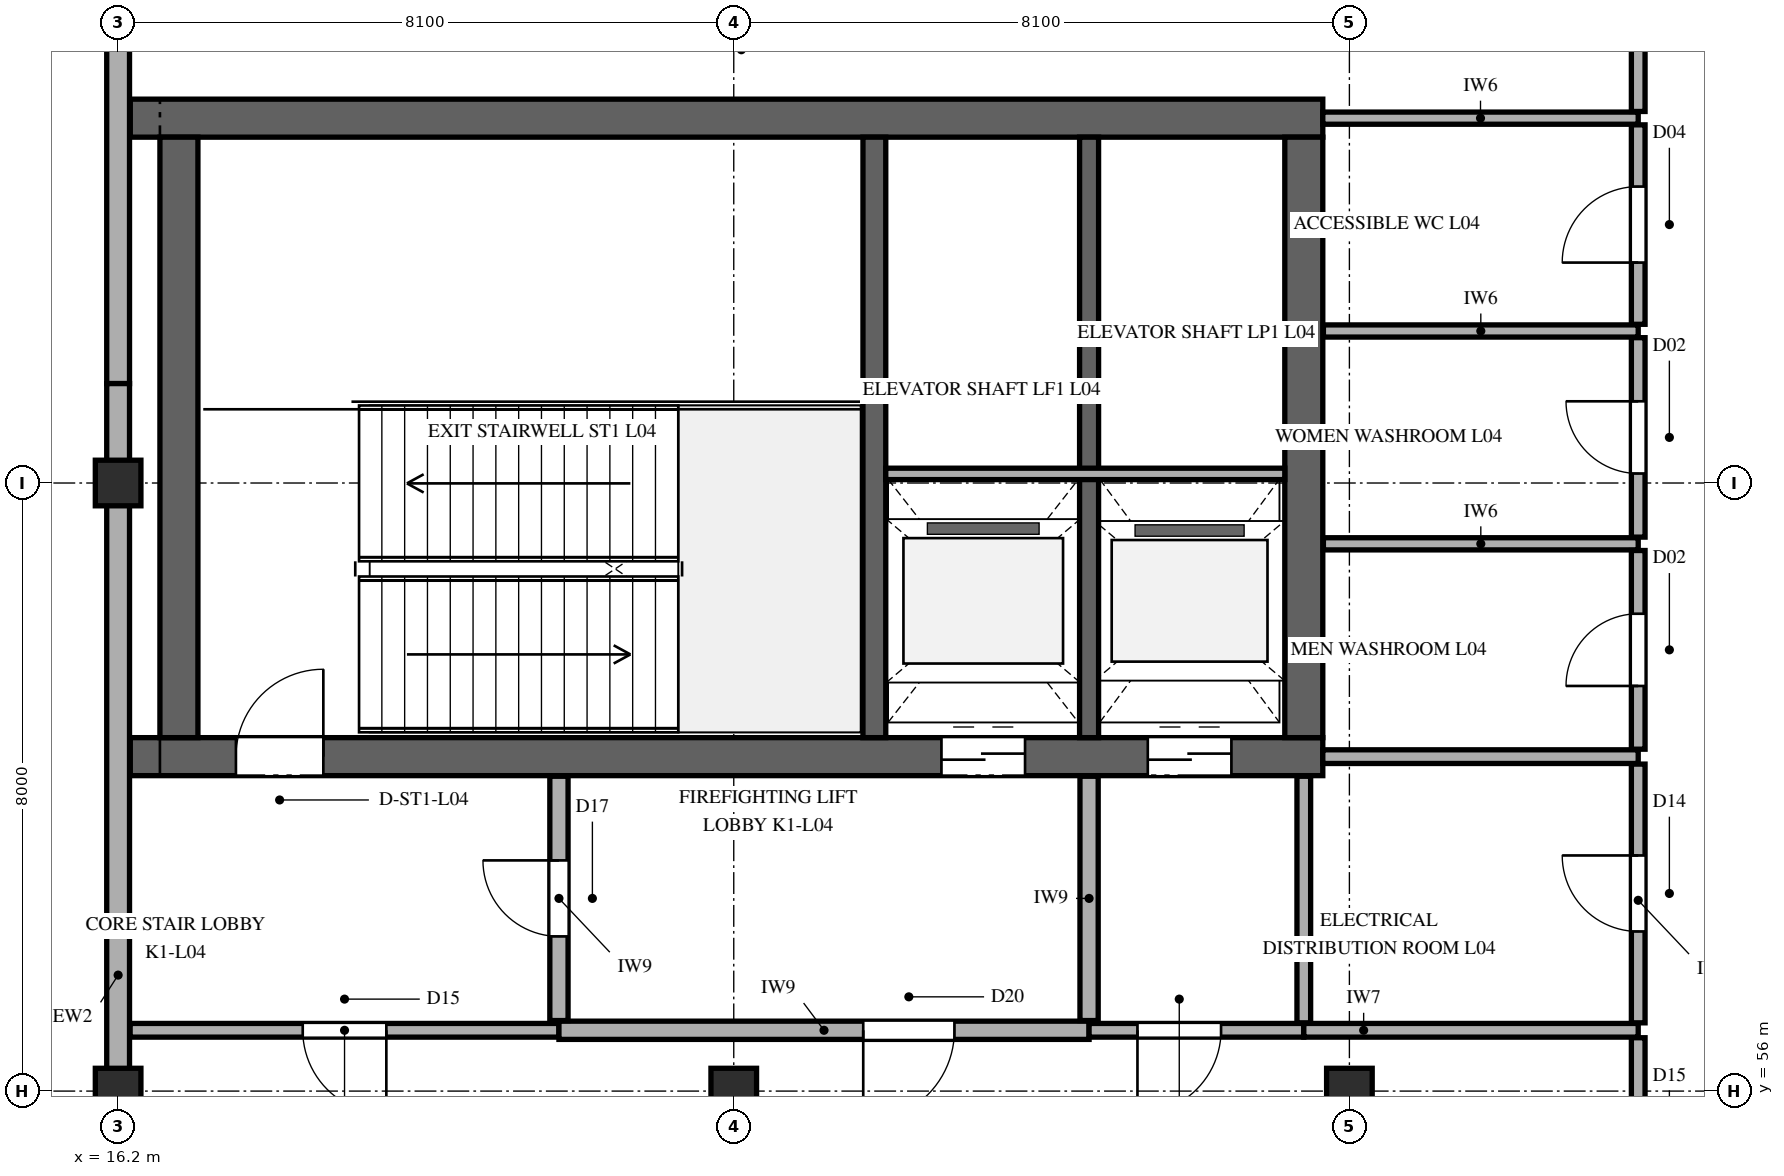
"""IFC4 building model, lengths in metres.
Left out: names, types, materials, properties, quantities, classifications, styles, units other than length and angle.
Written with IfcOpenShell. Run it as: python <this file> out.ifc"""

import sys

from ifc_helpers import new_model, si_unit, direction, frame, frame_2d, origin, origin_2d, place, context, subcontext, project, spatial, rectangle, extrude, element, fill, save


model = new_model("IFC4")
c1 = context("Model", 3, precision=1e-05, world=origin(), true_north=direction((0.0, 1.0)))
c2 = subcontext(c1, "Body", "Model", "MODEL_VIEW")
j1 = project(units=[si_unit("LENGTHUNIT", "METRE"), si_unit("PLANEANGLEUNIT", "RADIAN")], contexts=[c1])
p1 = place(None, origin())
s1 = spatial("IfcSite", under=j1, at=p1, CompositionType="ELEMENT")
p2 = place(p1, origin())
s2 = spatial("IfcBuilding", under=s1, at=p2, CompositionType="ELEMENT")
p3 = place(p2, frame((0.0, 0.0, 19.8)))
s3 = spatial("IfcBuildingStorey", under=s2, at=p3, CompositionType="ELEMENT", Elevation=19.8)
p4 = place(p3, frame((16.36, 60.4, 0.0), z_axis=(0.0, 0.0, 1.0), x_axis=(1.0, 0.0, 0.0)))
e1 = element("IfcWall", 1, at=p4, inside=s3, PredefinedType="SHEAR", context=c2, shape_type="SweptSolid", body=[
    extrude(rectangle(XDim=15.69, YDim=0.5, at=frame_2d((7.845, 0.0))), origin(), (0.0, 0.0, 1.0), 5.1),
])
p5 = place(p4, frame((1.39, 0.0, 0.0)))
e2 = element("IfcOpeningElement", 2, at=p5, cuts=e1, PredefinedType="OPENING", context=c2, shape_type="SweptSolid", body=[
    extrude(rectangle(XDim=1.15, YDim=2.25, at=frame_2d((0.575, 1.125))), frame((0.0, 0.26, 0.0), z_axis=(0.0, -1.0, 0.0), x_axis=(1.0, 0.0, 0.0)), (0.0, 0.0, 1.0), 0.52),
])
p6 = place(p4, frame((10.673, 0.0, 0.0)))
e3 = element("IfcOpeningElement", 3, at=p6, cuts=e1, PredefinedType="OPENING", context=c2, shape_type="SweptSolid", body=[
    extrude(rectangle(XDim=1.1, YDim=2.2, at=frame_2d((0.55, 1.1))), frame((0.0, 0.26, 0.0), z_axis=(0.0, -1.0, 0.0), x_axis=(1.0, 0.0, 0.0)), (0.0, 0.0, 1.0), 0.52),
])
p7 = place(p4, frame((13.387, 0.0, 0.0)))
e4 = element("IfcOpeningElement", 4, at=p7, cuts=e1, PredefinedType="OPENING", context=c2, shape_type="SweptSolid", body=[
    extrude(rectangle(XDim=1.1, YDim=2.2, at=frame_2d((0.55, 1.1))), frame((0.0, 0.26, 0.0), z_axis=(0.0, -1.0, 0.0), x_axis=(1.0, 0.0, 0.0)), (0.0, 0.0, 1.0), 0.52),
])
p8 = place(p3, frame((16.36, 68.8, 0.0), z_axis=(0.0, 0.0, 1.0), x_axis=(1.0, 0.0, 0.0)))
e5 = element("IfcWall", 5, at=p8, inside=s3, PredefinedType="SHEAR", context=c2, shape_type="SweptSolid", body=[
    extrude(rectangle(XDim=15.69, YDim=0.5, at=frame_2d((7.845, 0.0))), origin(), (0.0, 0.0, 1.0), 5.1),
])
for number, where, z_axis, x_axis in (
    (6, (17.0, 60.65, 0.0), (0.0, 0.0, 1.0), (0.0, 1.0, 0.0)),
    (7, (31.8, 60.65, 0.0), (0.0, 0.0, 1.0), (0.0, 1.0, 0.0)),
):
    element("IfcWall", number, at=place(p3, frame(where, z_axis=z_axis, x_axis=x_axis)), inside=s3, PredefinedType="SHEAR", context=c2, shape_type="SweptSolid", body=[
        extrude(rectangle(XDim=7.9, YDim=0.5, at=frame_2d((3.95, 0.0))), origin(), (0.0, 0.0, 1.0), 5.1),
    ])
p9 = place(p3, frame((26.15, 60.65, 0.0), z_axis=(0.0, 0.0, 1.0), x_axis=(0.0, 1.0, 0.0)))
e8 = element("IfcWall", 8, at=p9, inside=s3, PredefinedType="SHEAR", context=c2, shape_type="SweptSolid", body=[
    extrude(rectangle(XDim=7.9, YDim=0.3, at=frame_2d((3.95, 0.0))), origin(), (0.0, 0.0, 1.0), 5.1),
])
p10 = place(p3, frame((28.975, 60.65, 0.0), z_axis=(0.0, 0.0, 1.0), x_axis=(0.0, 1.0, 0.0)))
e9 = element("IfcWall", 9, at=p10, inside=s3, PredefinedType="SHEAR", context=c2, shape_type="SweptSolid", body=[
    extrude(rectangle(XDim=7.9, YDim=0.25, at=frame_2d((3.95, 0.0))), origin(), (0.0, 0.0, 1.0), 5.1),
])
for number, where, z_axis, x_axis in (
    (10, (16.2, 56.0, 0.0), (0.0, 0.0, 1.0), (1.0, 0.0, 0.0)),
    (11, (16.2, 64.0, 0.0), (0.0, 0.0, 1.0), (1.0, 0.0, 0.0)),
    (12, (24.3, 56.0, 0.0), (0.0, 0.0, 1.0), (1.0, 0.0, 0.0)),
    (13, (32.4, 56.0, 0.0), (0.0, 0.0, 1.0), (1.0, 0.0, 0.0)),
):
    element("IfcColumn", number, at=place(p3, frame(where, z_axis=z_axis, x_axis=x_axis)), inside=s3, PredefinedType="COLUMN", context=c2, shape_type="SweptSolid", body=[
        extrude(rectangle(XDim=0.6, YDim=0.6, at=origin_2d()), origin(), (0.0, 0.0, 1.0), 5.1),
    ])
p11 = place(p3, frame((16.2, 80.872, 0.0), z_axis=(0.0, 0.0, 1.0), x_axis=(0.0, -1.0, 0.0)))
e14 = element("IfcWall", 14, at=p11, inside=s3, PredefinedType="SOLIDWALL", context=c2, shape_type="SweptSolid", body=[
    extrude(rectangle(XDim=15.564, YDim=0.3, at=frame_2d((7.782, 0.0))), origin(), (0.0, 0.0, 1.0), 4.352),
])
p12 = place(p11, frame((4.5, 0.0, 0.85)))
e15 = element("IfcOpeningElement", 15, at=p12, cuts=e14, PredefinedType="OPENING", context=c2, shape_type="SweptSolid", body=[
    extrude(rectangle(XDim=1.35, YDim=2.1, at=frame_2d((0.675, 1.05))), frame((0.0, 0.16, 0.0), z_axis=(0.0, -1.0, 0.0), x_axis=(1.0, 0.0, 0.0)), (0.0, 0.0, 1.0), 0.32),
])
p13 = place(p3, frame((16.2, 65.308, 0.0), z_axis=(0.0, 0.0, 1.0), x_axis=(0.0, -1.0, 0.0)))
e16 = element("IfcWall", 16, at=p13, inside=s3, PredefinedType="SOLIDWALL", context=c2, shape_type="SweptSolid", body=[
    extrude(rectangle(XDim=15.564, YDim=0.3, at=frame_2d((7.782, 0.0))), origin(), (0.0, 0.0, 1.0), 4.289),
])
p14 = place(p3, frame((26.3, 64.12, 0.0), z_axis=(0.0, 0.0, 1.0), x_axis=(1.0, 0.0, 0.0)))
e17 = element("IfcWall", 17, at=p14, inside=s3, PredefinedType="PARTITIONING", context=c2, shape_type="SweptSolid", body=[
    extrude(rectangle(XDim=5.25, YDim=0.15, at=frame_2d((2.625, 0.0))), origin(), (0.0, 0.0, 1.0), 4.86),
])
p15 = place(p3, frame((16.358, 56.8, 0.0), z_axis=(0.0, 0.0, 1.0), x_axis=(1.0, 0.0, 0.0)))
e18 = element("IfcWall", 18, at=p15, inside=s3, PredefinedType="PARTITIONING", context=c2, shape_type="SweptSolid", body=[
    extrude(rectangle(XDim=5.642, YDim=0.18, at=frame_2d((2.821, 0.0))), origin(), (0.0, 0.0, 1.0), 4.86),
])
p16 = place(p15, frame((2.271, 0.0, 0.0)))
e19 = element("IfcOpeningElement", 19, at=p16, cuts=e18, PredefinedType="OPENING", context=c2, shape_type="SweptSolid", body=[
    extrude(rectangle(XDim=1.1, YDim=2.2, at=frame_2d((0.55, 1.1))), frame((0.0, 0.1, 0.0), z_axis=(0.0, -1.0, 0.0), x_axis=(1.0, 0.0, 0.0)), (0.0, 0.0, 1.0), 0.2),
])
p17 = place(p3, frame((22.0, 56.8, 0.0), z_axis=(0.0, 0.0, 1.0), x_axis=(1.0, 0.0, 0.0)))
e20 = element("IfcWall", 20, at=p17, inside=s3, PredefinedType="PARTITIONING", context=c2, shape_type="SweptSolid", body=[
    extrude(rectangle(XDim=6.975, YDim=0.24, at=frame_2d((3.488, 0.0))), origin(), (0.0, 0.0, 1.0), 4.86),
])
p18 = place(p17, frame((4.003, 0.0, 0.0)))
e21 = element("IfcOpeningElement", 21, at=p18, cuts=e20, PredefinedType="OPENING", context=c2, shape_type="SweptSolid", body=[
    extrude(rectangle(XDim=1.2, YDim=2.3, at=frame_2d((0.6, 1.15))), frame((0.0, 0.13, 0.0), z_axis=(0.0, -1.0, 0.0), x_axis=(1.0, 0.0, 0.0)), (0.0, 0.0, 1.0), 0.26),
])
p19 = place(p3, frame((28.975, 56.8, 0.0), z_axis=(0.0, 0.0, 1.0), x_axis=(1.0, 0.0, 0.0)))
e22 = element("IfcWall", 22, at=p19, inside=s3, PredefinedType="PARTITIONING", context=c2, shape_type="SweptSolid", body=[
    extrude(rectangle(XDim=2.825, YDim=0.18, at=frame_2d((1.413, 0.0))), origin(), (0.0, 0.0, 1.0), 4.86),
])
p20 = place(p19, frame((0.636, 0.0, 0.0)))
e23 = element("IfcOpeningElement", 23, at=p20, cuts=e22, PredefinedType="OPENING", context=c2, shape_type="SweptSolid", body=[
    extrude(rectangle(XDim=1.1, YDim=2.2, at=frame_2d((0.55, 1.1))), frame((0.0, 0.1, 0.0), z_axis=(0.0, -1.0, 0.0), x_axis=(1.0, 0.0, 0.0)), (0.0, 0.0, 1.0), 0.2),
])
p21 = place(p3, frame((31.8, 56.8, 0.0), z_axis=(0.0, 0.0, 1.0), x_axis=(1.0, 0.0, 0.0)))
e24 = element("IfcWall", 24, at=p21, inside=s3, PredefinedType="PARTITIONING", context=c2, shape_type="SweptSolid", body=[
    extrude(rectangle(XDim=4.4, YDim=0.18, at=frame_2d((2.2, 0.0))), origin(), (0.0, 0.0, 1.0), 4.86),
])
p22 = place(p3, frame((32.05, 60.4, 0.0), z_axis=(0.0, 0.0, 1.0), x_axis=(1.0, 0.0, 0.0)))
e25 = element("IfcWall", 25, at=p22, inside=s3, PredefinedType="PARTITIONING", context=c2, shape_type="SweptSolid", body=[
    extrude(rectangle(XDim=4.15, YDim=0.18, at=frame_2d((2.075, 0.0))), origin(), (0.0, 0.0, 1.0), 4.86),
])
for number, where, z_axis, x_axis in (
    (26, (32.058, 63.2, 0.0), (0.0, 0.0, 1.0), (1.0, 0.0, 0.0)),
    (27, (32.058, 66.0, 0.0), (0.0, 0.0, 1.0), (1.0, 0.0, 0.0)),
):
    element("IfcWall", number, at=place(p3, frame(where, z_axis=z_axis, x_axis=x_axis)), inside=s3, PredefinedType="PARTITIONING", context=c2, shape_type="SweptSolid", body=[
        extrude(rectangle(XDim=4.142, YDim=0.16, at=frame_2d((2.071, 0.0))), origin(), (0.0, 0.0, 1.0), 4.86),
    ])
p23 = place(p3, frame((32.05, 68.8, 0.0), z_axis=(0.0, 0.0, 1.0), x_axis=(1.0, 0.0, 0.0)))
e28 = element("IfcWall", 28, at=p23, inside=s3, PredefinedType="PARTITIONING", context=c2, shape_type="SweptSolid", body=[
    extrude(rectangle(XDim=4.15, YDim=0.16, at=frame_2d((2.075, 0.0))), origin(), (0.0, 0.0, 1.0), 4.86),
])
p24 = place(p3, frame((22.0, 56.928, 0.0), z_axis=(0.0, 0.0, 1.0), x_axis=(0.0, 1.0, 0.0)))
e29 = element("IfcWall", 29, at=p24, inside=s3, PredefinedType="PARTITIONING", context=c2, shape_type="SweptSolid", body=[
    extrude(rectangle(XDim=3.214, YDim=0.24, at=frame_2d((1.607, 0.0))), origin(), (0.0, 0.0, 1.0), 4.86),
])
p25 = place(p24, frame((1.107, 0.0, 0.0)))
e30 = element("IfcOpeningElement", 30, at=p25, cuts=e29, PredefinedType="OPENING", context=c2, shape_type="SweptSolid", body=[
    extrude(rectangle(XDim=1.0, YDim=2.2, at=frame_2d((0.5, 1.1))), frame((0.0, 0.13, 0.0), z_axis=(0.0, -1.0, 0.0), x_axis=(1.0, 0.0, 0.0)), (0.0, 0.0, 1.0), 0.26),
])
p26 = place(p3, frame((28.975, 56.928, 0.0), z_axis=(0.0, 0.0, 1.0), x_axis=(0.0, 1.0, 0.0)))
e31 = element("IfcWall", 31, at=p26, inside=s3, PredefinedType="PARTITIONING", context=c2, shape_type="SweptSolid", body=[
    extrude(rectangle(XDim=3.214, YDim=0.24, at=frame_2d((1.607, 0.0))), origin(), (0.0, 0.0, 1.0), 4.86),
])
p27 = place(p3, frame((31.8, 56.898, 0.0), z_axis=(0.0, 0.0, 1.0), x_axis=(0.0, 1.0, 0.0)))
e32 = element("IfcWall", 32, at=p27, inside=s3, PredefinedType="PARTITIONING", context=c2, shape_type="SweptSolid", body=[
    extrude(rectangle(XDim=3.244, YDim=0.18, at=frame_2d((1.622, 0.0))), origin(), (0.0, 0.0, 1.0), 4.86),
])
p28 = place(p3, frame((36.2, 53.298, 0.0), z_axis=(0.0, 0.0, 1.0), x_axis=(0.0, 1.0, 0.0)))
e33 = element("IfcWall", 33, at=p28, inside=s3, PredefinedType="PARTITIONING", context=c2, shape_type="SweptSolid", body=[
    extrude(rectangle(XDim=3.404, YDim=0.18, at=frame_2d((1.702, 0.0))), origin(), (0.0, 0.0, 1.0), 4.405),
])
p29 = place(p28, frame((1.152, 0.0, 0.0)))
e34 = element("IfcOpeningElement", 34, at=p29, cuts=e33, PredefinedType="OPENING", context=c2, shape_type="SweptSolid", body=[
    extrude(rectangle(XDim=1.1, YDim=2.2, at=frame_2d((0.55, 1.1))), frame((0.0, 0.1, 0.0), z_axis=(0.0, -1.0, 0.0), x_axis=(1.0, 0.0, 0.0)), (0.0, 0.0, 1.0), 0.2),
])
p30 = place(p3, frame((36.2, 56.898, 0.0), z_axis=(0.0, 0.0, 1.0), x_axis=(0.0, 1.0, 0.0)))
e35 = element("IfcWall", 35, at=p30, inside=s3, PredefinedType="PARTITIONING", context=c2, shape_type="SweptSolid", body=[
    extrude(rectangle(XDim=3.404, YDim=0.18, at=frame_2d((1.702, 0.0))), origin(), (0.0, 0.0, 1.0), 4.86),
])
p31 = place(p30, frame((1.202, 0.0, 0.0)))
e36 = element("IfcOpeningElement", 36, at=p31, cuts=e35, PredefinedType="OPENING", context=c2, shape_type="SweptSolid", body=[
    extrude(rectangle(XDim=1.0, YDim=2.15, at=frame_2d((0.5, 1.075))), frame((0.0, 0.1, 0.0), z_axis=(0.0, -1.0, 0.0), x_axis=(1.0, 0.0, 0.0)), (0.0, 0.0, 1.0), 0.2),
])
p32 = place(p3, frame((36.2, 60.498, 0.0), z_axis=(0.0, 0.0, 1.0), x_axis=(0.0, 1.0, 0.0)))
e37 = element("IfcWall", 37, at=p32, inside=s3, PredefinedType="PARTITIONING", context=c2, shape_type="SweptSolid", body=[
    extrude(rectangle(XDim=2.614, YDim=0.18, at=frame_2d((1.307, 0.0))), origin(), (0.0, 0.0, 1.0), 4.86),
])
p33 = place(p32, frame((0.832, 0.0, 0.0)))
e38 = element("IfcOpeningElement", 38, at=p33, cuts=e37, PredefinedType="OPENING", context=c2, shape_type="SweptSolid", body=[
    extrude(rectangle(XDim=0.95, YDim=2.1, at=frame_2d((0.475, 1.05))), frame((0.0, 0.1, 0.0), z_axis=(0.0, -1.0, 0.0), x_axis=(1.0, 0.0, 0.0)), (0.0, 0.0, 1.0), 0.2),
])
p34 = place(p3, frame((36.2, 63.288, 0.0), z_axis=(0.0, 0.0, 1.0), x_axis=(0.0, 1.0, 0.0)))
e39 = element("IfcWall", 39, at=p34, inside=s3, PredefinedType="PARTITIONING", context=c2, shape_type="SweptSolid", body=[
    extrude(rectangle(XDim=2.624, YDim=0.18, at=frame_2d((1.312, 0.0))), origin(), (0.0, 0.0, 1.0), 4.86),
])
p35 = place(p34, frame((0.837, 0.0, 0.0)))
e40 = element("IfcOpeningElement", 40, at=p35, cuts=e39, PredefinedType="OPENING", context=c2, shape_type="SweptSolid", body=[
    extrude(rectangle(XDim=0.95, YDim=2.1, at=frame_2d((0.475, 1.05))), frame((0.0, 0.1, 0.0), z_axis=(0.0, -1.0, 0.0), x_axis=(1.0, 0.0, 0.0)), (0.0, 0.0, 1.0), 0.2),
])
p36 = place(p3, frame((36.2, 66.088, 0.0), z_axis=(0.0, 0.0, 1.0), x_axis=(0.0, 1.0, 0.0)))
e41 = element("IfcWall", 41, at=p36, inside=s3, PredefinedType="PARTITIONING", context=c2, shape_type="SweptSolid", body=[
    extrude(rectangle(XDim=2.624, YDim=0.18, at=frame_2d((1.312, 0.0))), origin(), (0.0, 0.0, 1.0), 4.86),
])
p37 = place(p36, frame((0.812, 0.0, 0.0)))
e42 = element("IfcOpeningElement", 42, at=p37, cuts=e41, PredefinedType="OPENING", context=c2, shape_type="SweptSolid", body=[
    extrude(rectangle(XDim=1.0, YDim=2.15, at=frame_2d((0.5, 1.075))), frame((0.0, 0.1, 0.0), z_axis=(0.0, -1.0, 0.0), x_axis=(1.0, 0.0, 0.0)), (0.0, 0.0, 1.0), 0.2),
])
p38 = place(p3, frame((36.2, 68.888, 0.0), z_axis=(0.0, 0.0, 1.0), x_axis=(0.0, 1.0, 0.0)))
e43 = element("IfcWall", 43, at=p38, inside=s3, PredefinedType="PARTITIONING", context=c2, shape_type="SweptSolid", body=[
    extrude(rectangle(XDim=14.034, YDim=0.18, at=frame_2d((7.017, 0.0))), origin(), (0.0, 0.0, 1.0), 4.445),
])
p39 = place(p38, frame((6.517, 0.0, 0.0)))
e44 = element("IfcOpeningElement", 44, at=p39, cuts=e43, PredefinedType="OPENING", context=c2, shape_type="SweptSolid", body=[
    extrude(rectangle(XDim=1.0, YDim=2.2, at=frame_2d((0.5, 1.1))), frame((0.0, 0.1, 0.0), z_axis=(0.0, -1.0, 0.0), x_axis=(1.0, 0.0, 0.0)), (0.0, 0.0, 1.0), 0.2),
])
p40 = place(p5, origin())
e45 = element("IfcDoor", 45, at=p40, inside=s3, OperationType="SINGLE_SWING_RIGHT", PredefinedType="DOOR", context=c2, shape_type="SweptSolid", body=[
    extrude(rectangle(XDim=1.15, YDim=2.25, at=frame_2d((0.575, 1.125))), frame((0.0, 0.025, 0.0), z_axis=(0.0, -1.0, 0.0), x_axis=(1.0, 0.0, 0.0)), (0.0, 0.0, 1.0), 0.05),
])
fill(e2, e45)
p41 = place(p6, frame((1.1, 0.0, 0.0), z_axis=(0.0, 0.0, 1.0), x_axis=(-1.0, 0.0, 0.0)))
e46 = element("IfcDoor", 46, at=p41, inside=s3, OperationType="DOUBLE_DOOR_SLIDING", PredefinedType="DOOR", context=c2, shape_type="SweptSolid", body=[
    extrude(rectangle(XDim=1.1, YDim=2.2, at=frame_2d((0.55, 1.1))), frame((0.0, 0.025, 0.0), z_axis=(0.0, -1.0, 0.0), x_axis=(1.0, 0.0, 0.0)), (0.0, 0.0, 1.0), 0.05),
])
fill(e3, e46)
p42 = place(p7, frame((1.1, 0.0, 0.0), z_axis=(0.0, 0.0, 1.0), x_axis=(-1.0, 0.0, 0.0)))
e47 = element("IfcDoor", 47, at=p42, inside=s3, OperationType="DOUBLE_DOOR_SLIDING", PredefinedType="DOOR", context=c2, shape_type="SweptSolid", body=[
    extrude(rectangle(XDim=1.1, YDim=2.2, at=frame_2d((0.55, 1.1))), frame((0.0, 0.025, 0.0), z_axis=(0.0, -1.0, 0.0), x_axis=(1.0, 0.0, 0.0)), (0.0, 0.0, 1.0), 0.05),
])
fill(e4, e47)
p43 = place(p16, frame((1.1, 0.0, 0.0), z_axis=(0.0, 0.0, 1.0), x_axis=(-1.0, 0.0, 0.0)))
e48 = element("IfcDoor", 48, at=p43, inside=s3, OperationType="SINGLE_SWING_RIGHT", PredefinedType="DOOR", context=c2, shape_type="SweptSolid", body=[
    extrude(rectangle(XDim=1.1, YDim=2.2, at=frame_2d((0.55, 1.1))), frame((0.0, 0.025, 0.0), z_axis=(0.0, -1.0, 0.0), x_axis=(1.0, 0.0, 0.0)), (0.0, 0.0, 1.0), 0.05),
])
fill(e19, e48)
p44 = place(p18, frame((1.2, 0.0, 0.0), z_axis=(0.0, 0.0, 1.0), x_axis=(-1.0, 0.0, 0.0)))
e49 = element("IfcDoor", 49, at=p44, inside=s3, OperationType="SINGLE_SWING_LEFT", PredefinedType="DOOR", context=c2, shape_type="SweptSolid", body=[
    extrude(rectangle(XDim=1.2, YDim=2.3, at=frame_2d((0.6, 1.15))), frame((0.0, 0.025, 0.0), z_axis=(0.0, -1.0, 0.0), x_axis=(1.0, 0.0, 0.0)), (0.0, 0.0, 1.0), 0.05),
])
fill(e21, e49)
p45 = place(p20, frame((1.1, 0.0, 0.0), z_axis=(0.0, 0.0, 1.0), x_axis=(-1.0, 0.0, 0.0)))
e50 = element("IfcDoor", 50, at=p45, inside=s3, OperationType="SINGLE_SWING_LEFT", PredefinedType="DOOR", context=c2, shape_type="SweptSolid", body=[
    extrude(rectangle(XDim=1.1, YDim=2.2, at=frame_2d((0.55, 1.1))), frame((0.0, 0.025, 0.0), z_axis=(0.0, -1.0, 0.0), x_axis=(1.0, 0.0, 0.0)), (0.0, 0.0, 1.0), 0.05),
])
fill(e23, e50)
p46 = place(p25, origin())
e51 = element("IfcDoor", 51, at=p46, inside=s3, OperationType="SINGLE_SWING_RIGHT", PredefinedType="DOOR", context=c2, shape_type="SweptSolid", body=[
    extrude(rectangle(XDim=1.0, YDim=2.2, at=frame_2d((0.5, 1.1))), frame((0.0, 0.025, 0.0), z_axis=(0.0, -1.0, 0.0), x_axis=(1.0, 0.0, 0.0)), (0.0, 0.0, 1.0), 0.05),
])
fill(e30, e51)
p47 = place(p31, origin())
e52 = element("IfcDoor", 52, at=p47, inside=s3, OperationType="SINGLE_SWING_RIGHT", PredefinedType="DOOR", context=c2, shape_type="SweptSolid", body=[
    extrude(rectangle(XDim=1.0, YDim=2.15, at=frame_2d((0.5, 1.075))), frame((0.0, 0.025, 0.0), z_axis=(0.0, -1.0, 0.0), x_axis=(1.0, 0.0, 0.0)), (0.0, 0.0, 1.0), 0.05),
])
fill(e36, e52)
p48 = place(p33, origin())
e53 = element("IfcDoor", 53, at=p48, inside=s3, OperationType="SINGLE_SWING_LEFT", PredefinedType="DOOR", context=c2, shape_type="SweptSolid", body=[
    extrude(rectangle(XDim=0.95, YDim=2.1, at=frame_2d((0.475, 1.05))), frame((0.0, 0.025, 0.0), z_axis=(0.0, -1.0, 0.0), x_axis=(1.0, 0.0, 0.0)), (0.0, 0.0, 1.0), 0.05),
])
fill(e38, e53)
p49 = place(p35, origin())
e54 = element("IfcDoor", 54, at=p49, inside=s3, OperationType="SINGLE_SWING_RIGHT", PredefinedType="DOOR", context=c2, shape_type="SweptSolid", body=[
    extrude(rectangle(XDim=0.95, YDim=2.1, at=frame_2d((0.475, 1.05))), frame((0.0, 0.025, 0.0), z_axis=(0.0, -1.0, 0.0), x_axis=(1.0, 0.0, 0.0)), (0.0, 0.0, 1.0), 0.05),
])
fill(e40, e54)
p50 = place(p37, origin())
e55 = element("IfcDoor", 55, at=p50, inside=s3, OperationType="SINGLE_SWING_LEFT", PredefinedType="DOOR", context=c2, shape_type="SweptSolid", body=[
    extrude(rectangle(XDim=1.0, YDim=2.15, at=frame_2d((0.5, 1.075))), frame((0.0, 0.025, 0.0), z_axis=(0.0, -1.0, 0.0), x_axis=(1.0, 0.0, 0.0)), (0.0, 0.0, 1.0), 0.05),
])
fill(e42, e55)
save(model, sys.argv[1])
